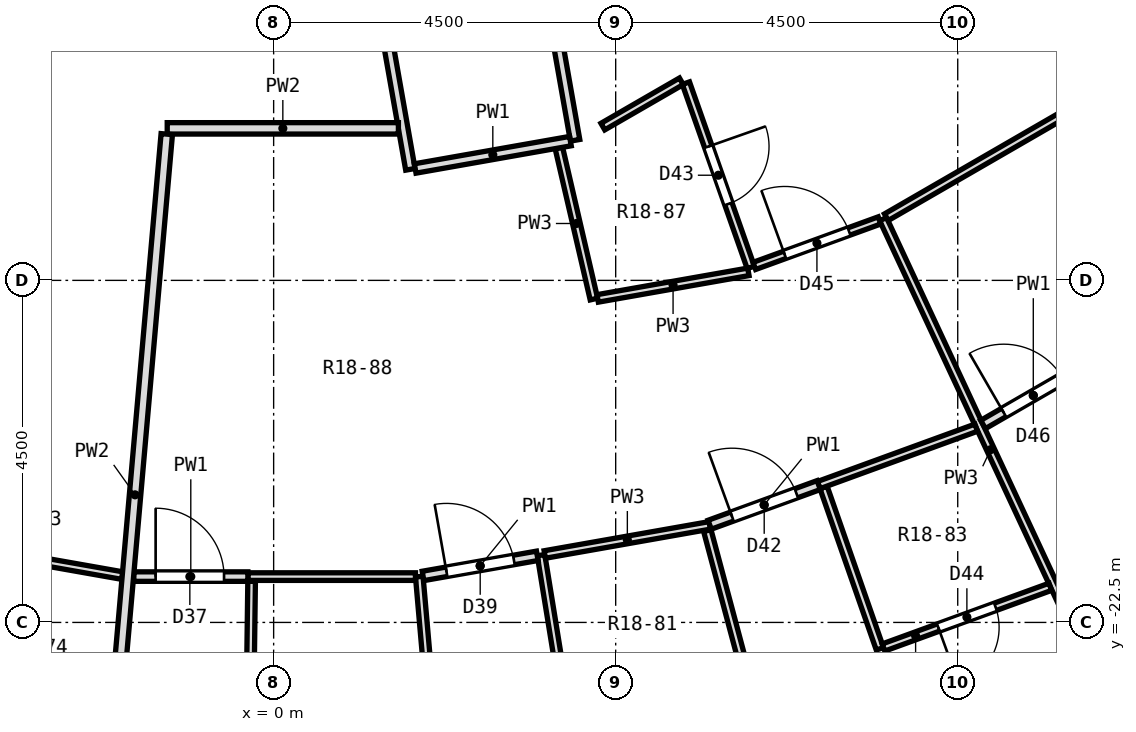
"""IFC4 building model, lengths in metres.
Left out: names, types, materials, properties, quantities, classifications, styles, units other than length and angle.
Written with IfcOpenShell. Run it as: python <this file> out.ifc"""

import sys

from ifc_helpers import new_model, si_unit, direction, frame, frame_2d, origin, place, context, subcontext, project, spatial, rectangle, extrude, element, fill, save


model = new_model("IFC4")
c1 = context("Model", 3, precision=1e-05, world=origin(), true_north=direction((0.0, 1.0)))
c2 = subcontext(c1, "Body", "Model", "MODEL_VIEW")
j1 = project(units=[si_unit("LENGTHUNIT", "METRE"), si_unit("PLANEANGLEUNIT", "RADIAN")], contexts=[c1])
p1 = place(None, origin())
s1 = spatial("IfcSite", under=j1, at=p1, CompositionType="ELEMENT")
p2 = place(p1, origin())
s2 = spatial("IfcBuilding", under=s1, at=p2, CompositionType="ELEMENT")
p3 = place(p2, frame((0.0, 0.0, 101.8)))
s3 = spatial("IfcBuildingStorey", under=s2, at=p3, CompositionType="ELEMENT", Elevation=101.8)
p4 = place(p3, frame((1.916, -21.897, 0.0), z_axis=(0.0, 0.0, 1.0), x_axis=(0.087069954148, -0.996202199899, 0.0)))
e1 = element("IfcWall", 1, at=p4, inside=s3, PredefinedType="PARTITIONING", context=c2, shape_type="SweptSolid", body=[
    extrude(rectangle(XDim=3.684, YDim=0.1, at=frame_2d((1.842, 0.0))), origin(), (0.0, 0.0, 1.0), 2.8),
])
p5 = place(p3, frame((3.518, -21.615, 0.0), z_axis=(0.0, 0.0, 1.0), x_axis=(0.160403826344, -0.987051474085, 0.0)))
e2 = element("IfcWall", 2, at=p5, inside=s3, PredefinedType="PARTITIONING", context=c2, shape_type="SweptSolid", body=[
    extrude(rectangle(XDim=2.3, YDim=0.1, at=frame_2d((1.15, 0.0))), origin(), (0.0, 0.0, 1.0), 2.8),
])
p6 = place(p3, frame((0.893, -11.4, 0.0), z_axis=(0.0, 0.0, 1.0), x_axis=(0.173617189854, -0.984813216497, 0.0)))
e3 = element("IfcWall", 3, at=p6, inside=s3, PredefinedType="PARTITIONING", context=c2, shape_type="SweptSolid", body=[
    extrude(rectangle(XDim=5.219, YDim=0.125, at=frame_2d((2.609, 0.0))), origin(), (0.0, 0.0, 1.0), 2.8),
])
p7 = place(p3, frame((3.06, -11.019, 0.0), z_axis=(0.0, 0.0, 1.0), x_axis=(0.173641190819, -0.984808984956, 0.0)))
e4 = element("IfcWall", 4, at=p7, inside=s3, PredefinedType="PARTITIONING", context=c2, shape_type="SweptSolid", body=[
    extrude(rectangle(XDim=5.218, YDim=0.125, at=frame_2d((2.609, 0.0))), origin(), (0.0, 0.0, 1.0), 2.8),
])
p8 = place(p7, frame((2.029, 0.0, 0.0)))
e5 = element("IfcOpeningElement", 5, at=p8, cuts=e4, PredefinedType="OPENING", context=c2, shape_type="SweptSolid", body=[
    extrude(rectangle(XDim=1.0, YDim=2.1, at=frame_2d((0.5, 1.05))), frame((0.0, 0.074, 0.0), z_axis=(0.0, -1.0, 0.0), x_axis=(1.0, 0.0, 0.0)), (0.0, 0.0, 1.0), 0.149),
])
p9 = place(p3, frame((3.753, -16.258, 0.0), z_axis=(0.0, 0.0, 1.0), x_axis=(0.22577693712, -0.974179025983, 0.0)))
e6 = element("IfcWall", 6, at=p9, inside=s3, PredefinedType="PARTITIONING", context=c2, shape_type="SweptSolid", body=[
    extrude(rectangle(XDim=2.041, YDim=0.1, at=frame_2d((1.02, 0.0))), origin(), (0.0, 0.0, 1.0), 2.8),
])
p10 = place(p3, frame((5.706, -21.292, 0.0), z_axis=(0.0, 0.0, 1.0), x_axis=(0.258396854417, -0.966038853063, 0.0)))
e7 = element("IfcWall", 7, at=p10, inside=s3, PredefinedType="PARTITIONING", context=c2, shape_type="SweptSolid", body=[
    extrude(rectangle(XDim=3.622, YDim=0.1, at=frame_2d((1.811, 0.0))), origin(), (0.0, 0.0, 1.0), 2.8),
])
p11 = place(p3, frame((7.234, -20.723, 0.0), z_axis=(0.0, 0.0, 1.0), x_axis=(0.329707399535, -0.944083169372, 0.0)))
e8 = element("IfcWall", 8, at=p11, inside=s3, PredefinedType="PARTITIONING", context=c2, shape_type="SweptSolid", body=[
    extrude(rectangle(XDim=2.25, YDim=0.1, at=frame_2d((1.125, 0.0))), origin(), (0.0, 0.0, 1.0), 2.8),
])
p12 = place(p3, frame((5.424, -15.405, 0.0), z_axis=(0.0, 0.0, 1.0), x_axis=(0.332059637914, -0.943258393479, 0.0)))
e9 = element("IfcWall", 9, at=p12, inside=s3, PredefinedType="PARTITIONING", context=c2, shape_type="SweptSolid", body=[
    extrude(rectangle(XDim=2.57, YDim=0.1, at=frame_2d((1.285, 0.0))), origin(), (0.0, 0.0, 1.0), 2.8),
])
p13 = place(p12, frame((0.885, 0.0, 0.0)))
e10 = element("IfcOpeningElement", 10, at=p13, cuts=e9, PredefinedType="OPENING", context=c2, shape_type="SweptSolid", body=[
    extrude(rectangle(XDim=0.8, YDim=2.1, at=frame_2d((0.4, 1.05))), frame((0.0, 0.062, 0.0), z_axis=(0.0, -1.0, 0.0), x_axis=(1.0, 0.0, 0.0)), (0.0, 0.0, 1.0), 0.124),
])
p14 = place(p3, frame((8.018, -17.194, 0.0), z_axis=(0.0, 0.0, 1.0), x_axis=(0.422490057257, -0.906367558731, 0.0)))
e11 = element("IfcWall", 11, at=p14, inside=s3, PredefinedType="PARTITIONING", context=c2, shape_type="SweptSolid", body=[
    extrude(rectangle(XDim=6.693, YDim=0.1, at=frame_2d((3.347, 0.0))), origin(), (0.0, 0.0, 1.0), 2.8),
])
p15 = place(p3, frame((-4.025, -21.525, 0.0), z_axis=(0.0, 0.0, 1.0), x_axis=(0.984791880798, -0.173738169424, 0.0)))
e12 = element("IfcWall", 12, at=p15, inside=s3, PredefinedType="PARTITIONING", context=c2, shape_type="SweptSolid", body=[
    extrude(rectangle(XDim=2.067, YDim=0.1, at=frame_2d((1.034, 0.0))), origin(), (0.0, 0.0, 1.0), 2.8),
])
p16 = place(p3, frame((-0.339, -21.897, 0.0), z_axis=(0.0, 0.0, 1.0), x_axis=(1.0, 0.0, 0.0)))
e13 = element("IfcWall", 13, at=p16, inside=s3, PredefinedType="PARTITIONING", context=c2, shape_type="SweptSolid", body=[
    extrude(rectangle(XDim=2.205, YDim=0.1, at=frame_2d((1.103, 0.0))), origin(), (0.0, 0.0, 1.0), 2.8),
])
p17 = place(p3, frame((-1.841, -21.897, 0.0), z_axis=(0.0, 0.0, 1.0), x_axis=(1.0, 0.0, 0.0)))
e14 = element("IfcWall", 14, at=p17, inside=s3, PredefinedType="PARTITIONING", context=c2, shape_type="SweptSolid", body=[
    extrude(rectangle(XDim=1.502, YDim=0.125, at=frame_2d((0.751, 0.0))), origin(), (0.0, 0.0, 1.0), 2.8),
])
p18 = place(p17, frame((0.289, 0.0, 0.0)))
e15 = element("IfcOpeningElement", 15, at=p18, cuts=e14, PredefinedType="OPENING", context=c2, shape_type="SweptSolid", body=[
    extrude(rectangle(XDim=0.9, YDim=2.1, at=frame_2d((0.45, 1.05))), frame((0.0, 0.074, 0.0), z_axis=(0.0, -1.0, 0.0), x_axis=(1.0, 0.0, 0.0)), (0.0, 0.0, 1.0), 0.149),
])
p19 = place(p3, frame((-1.4, -16.0, 0.0), z_axis=(0.0, 0.0, 1.0), x_axis=(1.0, 0.0, 0.0)))
e16 = element("IfcWall", 16, at=p19, inside=s3, PredefinedType="PARTITIONING", context=c2, shape_type="SweptSolid", body=[
    extrude(rectangle(XDim=3.042, YDim=0.15, at=frame_2d((1.521, 0.0))), origin(), (0.0, 0.0, 1.0), 2.8),
])
p20 = place(p3, frame((3.567, -21.606, 0.0), z_axis=(0.0, 0.0, 1.0), x_axis=(0.984800270927, 0.173690605338, 0.0)))
e17 = element("IfcWall", 17, at=p20, inside=s3, PredefinedType="PARTITIONING", context=c2, shape_type="SweptSolid", body=[
    extrude(rectangle(XDim=2.205, YDim=0.1, at=frame_2d((1.103, 0.0))), origin(), (0.0, 0.0, 1.0), 2.8),
])
p21 = place(p3, frame((1.965, -21.888, 0.0), z_axis=(0.0, 0.0, 1.0), x_axis=(0.984857531579, 0.173365632386, 0.0)))
e18 = element("IfcWall", 18, at=p21, inside=s3, PredefinedType="PARTITIONING", context=c2, shape_type="SweptSolid", body=[
    extrude(rectangle(XDim=1.527, YDim=0.125, at=frame_2d((0.763, 0.0))), origin(), (0.0, 0.0, 1.0), 2.8),
])
p22 = place(p21, frame((0.314, 0.0, 0.0)))
e19 = element("IfcOpeningElement", 19, at=p22, cuts=e18, PredefinedType="OPENING", context=c2, shape_type="SweptSolid", body=[
    extrude(rectangle(XDim=0.9, YDim=2.1, at=frame_2d((0.45, 1.05))), frame((0.0, 0.074, 0.0), z_axis=(0.0, -1.0, 0.0), x_axis=(1.0, 0.0, 0.0)), (0.0, 0.0, 1.0), 0.149),
])
p23 = place(p3, frame((4.263, -18.237, 0.0), z_axis=(0.0, 0.0, 1.0), x_axis=(0.984827477251, 0.173536278777, 0.0)))
e20 = element("IfcWall", 20, at=p23, inside=s3, PredefinedType="PARTITIONING", context=c2, shape_type="SweptSolid", body=[
    extrude(rectangle(XDim=2.013, YDim=0.1, at=frame_2d((1.007, 0.0))), origin(), (0.0, 0.0, 1.0), 2.8),
])
p24 = place(p3, frame((1.862, -16.528, 0.0), z_axis=(0.0, 0.0, 1.0), x_axis=(0.984827380623, 0.173536827142, 0.0)))
e21 = element("IfcWall", 21, at=p24, inside=s3, PredefinedType="PARTITIONING", context=c2, shape_type="SweptSolid", body=[
    extrude(rectangle(XDim=2.074, YDim=0.125, at=frame_2d((1.037, 0.0))), origin(), (0.0, 0.0, 1.0), 2.8),
])
p25 = place(p3, frame((8.023, -22.83, 0.0), z_axis=(0.0, 0.0, 1.0), x_axis=(0.939707949959, 0.341978023831, 0.0)))
e22 = element("IfcWall", 22, at=p25, inside=s3, PredefinedType="PARTITIONING", context=c2, shape_type="SweptSolid", body=[
    extrude(rectangle(XDim=2.336, YDim=0.1, at=frame_2d((1.168, 0.0))), origin(), (0.0, 0.0, 1.0), 2.8),
])
p26 = place(p25, frame((0.768, 0.0, 0.0)))
e23 = element("IfcOpeningElement", 23, at=p26, cuts=e22, PredefinedType="OPENING", context=c2, shape_type="SweptSolid", body=[
    extrude(rectangle(XDim=0.8, YDim=2.1, at=frame_2d((0.4, 1.05))), frame((0.0, 0.062, 0.0), z_axis=(0.0, -1.0, 0.0), x_axis=(1.0, 0.0, 0.0)), (0.0, 0.0, 1.0), 0.124),
])
p27 = place(p3, frame((7.171, -20.693, 0.0), z_axis=(0.0, 0.0, 1.0), x_axis=(0.939573404597, 0.342347509665, 0.0)))
e24 = element("IfcWall", 24, at=p27, inside=s3, PredefinedType="PARTITIONING", context=c2, shape_type="SweptSolid", body=[
    extrude(rectangle(XDim=2.205, YDim=0.1, at=frame_2d((1.103, 0.0))), origin(), (0.0, 0.0, 1.0), 2.8),
])
p28 = place(p3, frame((5.736, -21.215, 0.0), z_axis=(0.0, 0.0, 1.0), x_axis=(0.939798092341, 0.34173022347, 0.0)))
e25 = element("IfcWall", 25, at=p28, inside=s3, PredefinedType="PARTITIONING", context=c2, shape_type="SweptSolid", body=[
    extrude(rectangle(XDim=1.527, YDim=0.125, at=frame_2d((0.763, 0.0))), origin(), (0.0, 0.0, 1.0), 2.8),
])
p29 = place(p28, frame((0.314, 0.0, 0.0)))
e26 = element("IfcOpeningElement", 26, at=p29, cuts=e25, PredefinedType="OPENING", context=c2, shape_type="SweptSolid", body=[
    extrude(rectangle(XDim=0.9, YDim=2.1, at=frame_2d((0.45, 1.05))), frame((0.0, 0.074, 0.0), z_axis=(0.0, -1.0, 0.0), x_axis=(1.0, 0.0, 0.0)), (0.0, 0.0, 1.0), 0.149),
])
p30 = place(p3, frame((6.324, -17.81, 0.0), z_axis=(0.0, 0.0, 1.0), x_axis=(0.939842226204, 0.341608825771, 0.0)))
e27 = element("IfcWall", 27, at=p30, inside=s3, PredefinedType="PARTITIONING", context=c2, shape_type="SweptSolid", body=[
    extrude(rectangle(XDim=1.752, YDim=0.1, at=frame_2d((0.876, 0.0))), origin(), (0.0, 0.0, 1.0), 2.8),
])
p31 = place(p30, frame((0.426, 0.0, 0.0)))
e28 = element("IfcOpeningElement", 28, at=p31, cuts=e27, PredefinedType="OPENING", context=c2, shape_type="SweptSolid", body=[
    extrude(rectangle(XDim=0.9, YDim=2.1, at=frame_2d((0.45, 1.05))), frame((0.0, 0.062, 0.0), z_axis=(0.0, -1.0, 0.0), x_axis=(1.0, 0.0, 0.0)), (0.0, 0.0, 1.0), 0.124),
])
p32 = place(p3, frame((9.333, -19.896, 0.0), z_axis=(0.0, 0.0, 1.0), x_axis=(0.86603905187, 0.499976360077, 0.0)))
e29 = element("IfcWall", 29, at=p32, inside=s3, PredefinedType="PARTITIONING", context=c2, shape_type="SweptSolid", body=[
    extrude(rectangle(XDim=1.526, YDim=0.125, at=frame_2d((0.763, 0.0))), origin(), (0.0, 0.0, 1.0), 2.8),
])
p33 = place(p32, frame((0.313, 0.0, 0.0)))
e30 = element("IfcOpeningElement", 30, at=p33, cuts=e29, PredefinedType="OPENING", context=c2, shape_type="SweptSolid", body=[
    extrude(rectangle(XDim=0.9, YDim=2.1, at=frame_2d((0.45, 1.05))), frame((0.0, 0.074, 0.0), z_axis=(0.0, -1.0, 0.0), x_axis=(1.0, 0.0, 0.0)), (0.0, 0.0, 1.0), 0.149),
])
p34 = place(p3, frame((8.061, -17.169, 0.0), z_axis=(0.0, 0.0, 1.0), x_axis=(0.865907705821, 0.500203803465, 0.0)))
e31 = element("IfcWall", 31, at=p34, inside=s3, PredefinedType="PARTITIONING", context=c2, shape_type="SweptSolid", body=[
    extrude(rectangle(XDim=3.307, YDim=0.1, at=frame_2d((1.654, 0.0))), origin(), (0.0, 0.0, 1.0), 2.8),
])
p35 = place(p3, frame((4.331, -15.977, 0.0), z_axis=(0.0, 0.0, 1.0), x_axis=(0.86607987314, 0.499905644439, 0.0)))
e32 = element("IfcWall", 32, at=p35, inside=s3, PredefinedType="PARTITIONING", context=c2, shape_type="SweptSolid", body=[
    extrude(rectangle(XDim=1.192, YDim=0.1, at=frame_2d((0.596, 0.0))), origin(), (0.0, 0.0, 1.0), 2.8),
])
p36 = place(p3, frame((-2.24, -25.567, 0.0), z_axis=(0.0, 0.0, 1.0), x_axis=(0.087555048891, 0.996159682688, 0.0)))
e33 = element("IfcWall", 33, at=p36, inside=s3, PredefinedType="PARTITIONING", context=c2, shape_type="SweptSolid", body=[
    extrude(rectangle(XDim=9.528, YDim=0.15, at=frame_2d((4.764, 0.0))), origin(), (0.0, 0.0, 1.0), 2.8),
])
p37 = place(p3, frame((-0.318, -24.147, 0.0), z_axis=(0.0, 0.0, 1.0), x_axis=(0.013056922579, 0.999914754753, 0.0)))
e34 = element("IfcWall", 34, at=p37, inside=s3, PredefinedType="PARTITIONING", context=c2, shape_type="SweptSolid", body=[
    extrude(rectangle(XDim=2.188, YDim=0.1, at=frame_2d((1.094, 0.0))), origin(), (0.0, 0.0, 1.0), 2.8),
])
p38 = place(p18, origin())
e35 = element("IfcDoor", 35, at=p38, inside=s3, OperationType="SINGLE_SWING_LEFT", PredefinedType="DOOR", context=c2, shape_type="SweptSolid", body=[
    extrude(rectangle(XDim=0.9, YDim=2.1, at=frame_2d((0.45, 1.05))), frame((0.0, 0.025, 0.0), z_axis=(0.0, -1.0, 0.0), x_axis=(1.0, 0.0, 0.0)), (0.0, 0.0, 1.0), 0.05),
])
fill(e15, e35)
p39 = place(p22, origin())
e36 = element("IfcDoor", 36, at=p39, inside=s3, OperationType="SINGLE_SWING_LEFT", PredefinedType="DOOR", context=c2, shape_type="SweptSolid", body=[
    extrude(rectangle(XDim=0.9, YDim=2.1, at=frame_2d((0.45, 1.05))), frame((0.0, 0.025, 0.0), z_axis=(0.0, -1.0, 0.0), x_axis=(1.0, 0.0, 0.0)), (0.0, 0.0, 1.0), 0.05),
])
fill(e19, e36)
p40 = place(p29, origin())
e37 = element("IfcDoor", 37, at=p40, inside=s3, OperationType="SINGLE_SWING_LEFT", PredefinedType="DOOR", context=c2, shape_type="SweptSolid", body=[
    extrude(rectangle(XDim=0.9, YDim=2.1, at=frame_2d((0.45, 1.05))), frame((0.0, 0.025, 0.0), z_axis=(0.0, -1.0, 0.0), x_axis=(1.0, 0.0, 0.0)), (0.0, 0.0, 1.0), 0.05),
])
fill(e26, e37)
p41 = place(p13, origin())
e38 = element("IfcDoor", 38, at=p41, inside=s3, OperationType="SINGLE_SWING_LEFT", PredefinedType="DOOR", context=c2, shape_type="SweptSolid", body=[
    extrude(rectangle(XDim=0.8, YDim=2.1, at=frame_2d((0.4, 1.05))), frame((0.0, 0.025, 0.0), z_axis=(0.0, -1.0, 0.0), x_axis=(1.0, 0.0, 0.0)), (0.0, 0.0, 1.0), 0.05),
])
fill(e10, e38)
p42 = place(p26, frame((0.8, 0.0, 0.0), z_axis=(0.0, 0.0, 1.0), x_axis=(-1.0, 0.0, 0.0)))
e39 = element("IfcDoor", 39, at=p42, inside=s3, OperationType="SINGLE_SWING_RIGHT", PredefinedType="DOOR", context=c2, shape_type="SweptSolid", body=[
    extrude(rectangle(XDim=0.8, YDim=2.1, at=frame_2d((0.4, 1.05))), frame((0.0, 0.025, 0.0), z_axis=(0.0, -1.0, 0.0), x_axis=(1.0, 0.0, 0.0)), (0.0, 0.0, 1.0), 0.05),
])
fill(e23, e39)
p43 = place(p31, origin())
e40 = element("IfcDoor", 40, at=p43, inside=s3, OperationType="SINGLE_SWING_LEFT", PredefinedType="DOOR", context=c2, shape_type="SweptSolid", body=[
    extrude(rectangle(XDim=0.9, YDim=2.1, at=frame_2d((0.45, 1.05))), frame((0.0, 0.025, 0.0), z_axis=(0.0, -1.0, 0.0), x_axis=(1.0, 0.0, 0.0)), (0.0, 0.0, 1.0), 0.05),
])
fill(e28, e40)
p44 = place(p33, origin())
e41 = element("IfcDoor", 41, at=p44, inside=s3, OperationType="SINGLE_SWING_LEFT", PredefinedType="DOOR", context=c2, shape_type="SweptSolid", body=[
    extrude(rectangle(XDim=0.9, YDim=2.1, at=frame_2d((0.45, 1.05))), frame((0.0, 0.025, 0.0), z_axis=(0.0, -1.0, 0.0), x_axis=(1.0, 0.0, 0.0)), (0.0, 0.0, 1.0), 0.05),
])
fill(e30, e41)
save(model, sys.argv[1])
